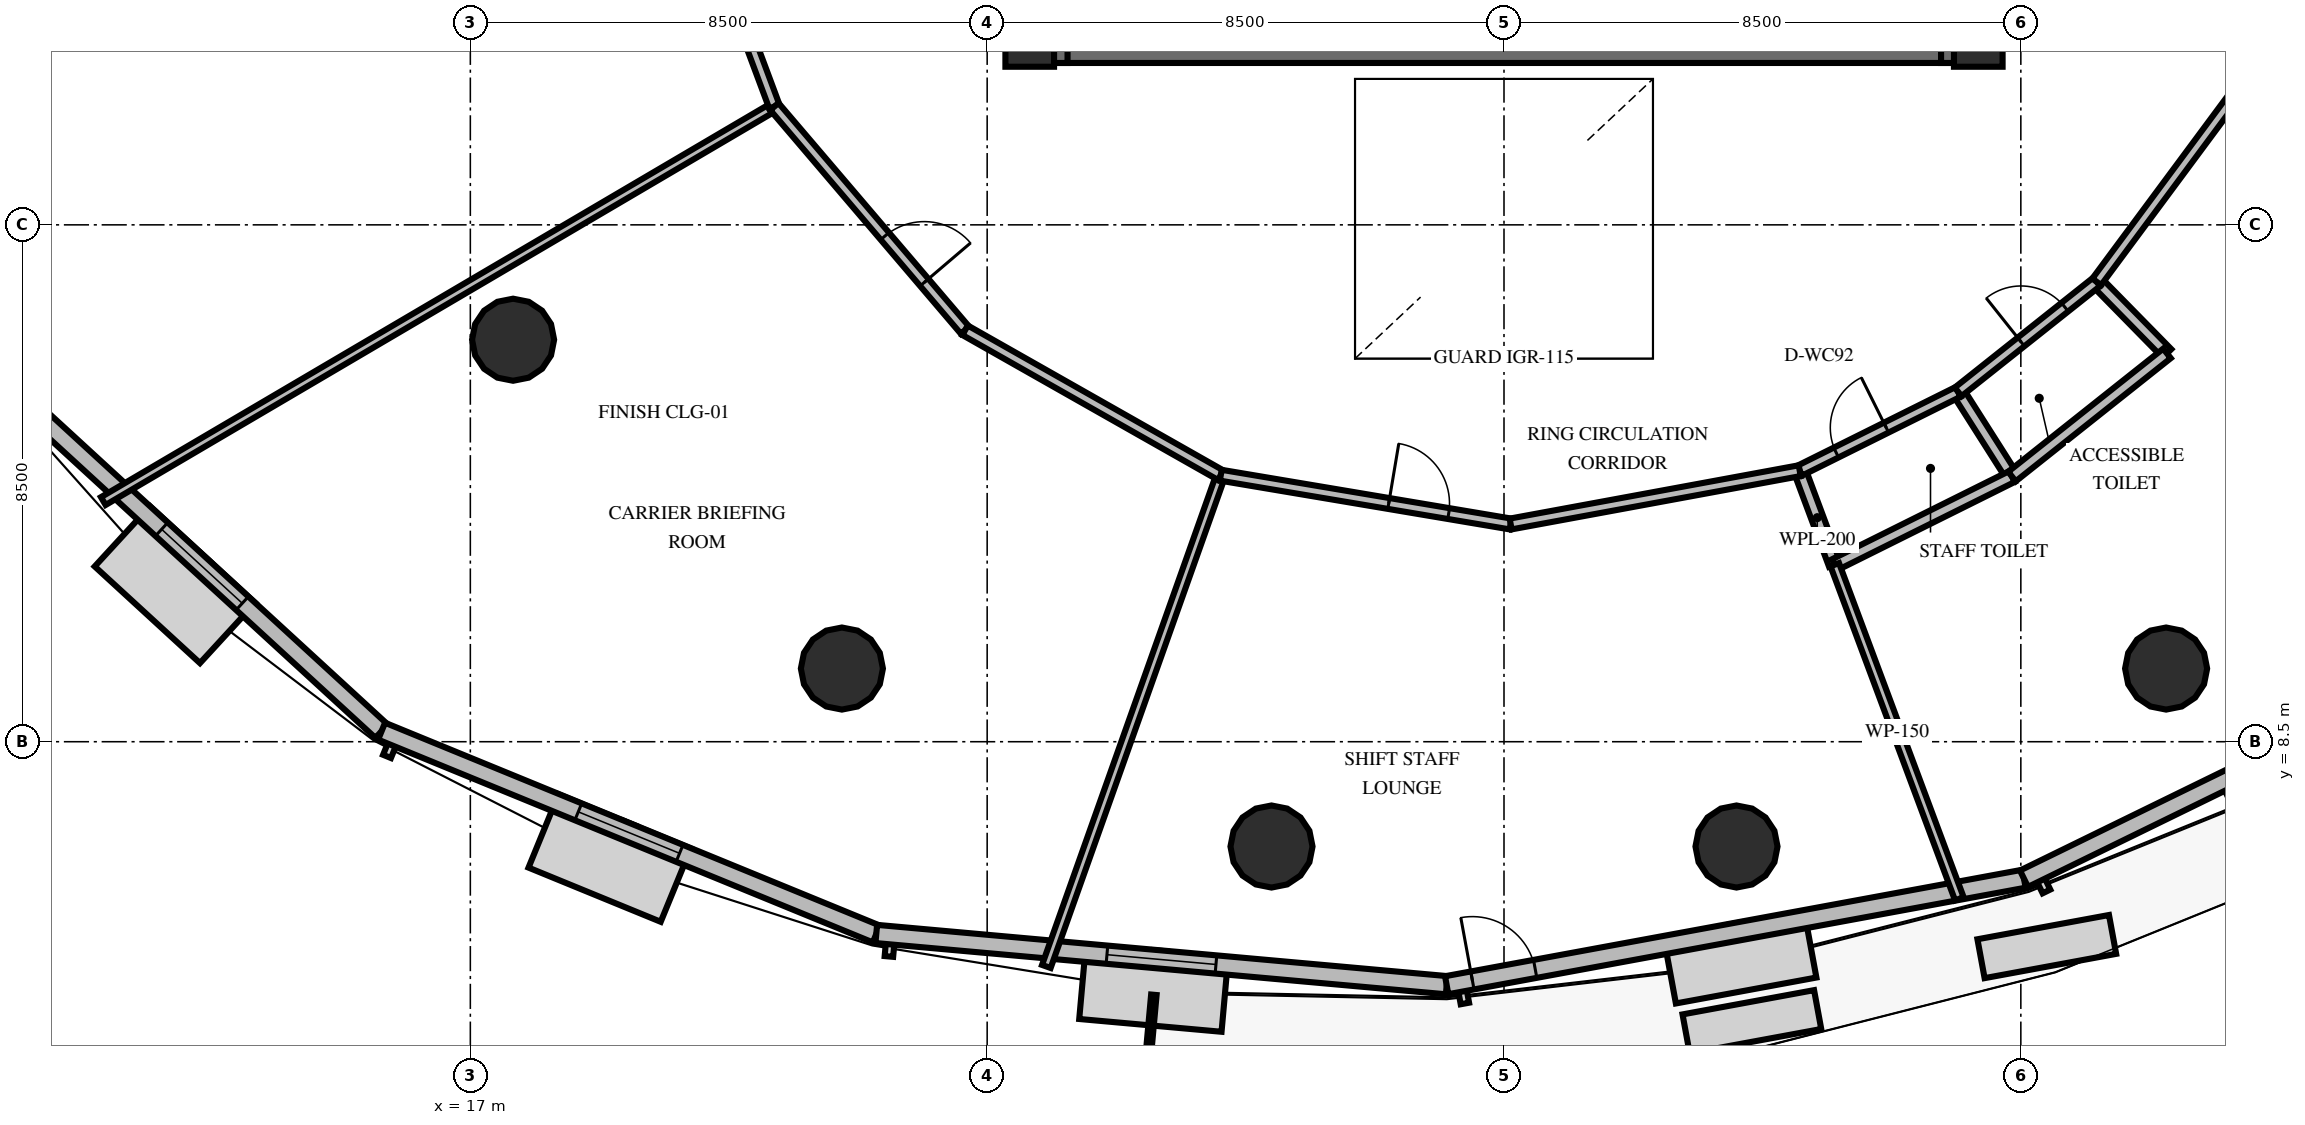
"""IFC4 building model, lengths in metres.
Left out: names, types, materials, properties, quantities, classifications, styles, units other than length and angle.
Written with IfcOpenShell. Run it as: python <this file> out.ifc"""

import sys

from ifc_helpers import new_model, si_unit, direction, frame, frame_2d, origin, origin_2d, place, context, subcontext, project, spatial, rectangle, circle, extrude, element, fill, save


model = new_model("IFC4")
c1 = context("Model", 3, precision=1e-05, world=origin(), true_north=direction((0.0, 1.0)))
c2 = subcontext(c1, "Body", "Model", "MODEL_VIEW")
j1 = project(units=[si_unit("LENGTHUNIT", "METRE"), si_unit("PLANEANGLEUNIT", "RADIAN")], contexts=[c1])
p1 = place(None, origin())
s1 = spatial("IfcSite", under=j1, at=p1, CompositionType="ELEMENT")
p2 = place(p1, origin())
s2 = spatial("IfcBuilding", under=s1, at=p2, CompositionType="ELEMENT")
p3 = place(p2, frame((0.0, 0.0, 76.2)))
s3 = spatial("IfcBuildingStorey", under=s2, at=p3, CompositionType="ELEMENT", Elevation=76.2)
p4 = place(p3, frame((25.922, 20.112, 0.0), z_axis=(0.0, 0.0, 1.0), x_axis=(1.0, 0.0, 0.0)))
e1 = element("IfcWall", 1, at=p4, inside=s3, PredefinedType="SHEAR", context=c2, shape_type="SweptSolid", body=[
    extrude(rectangle(XDim=16.166, YDim=0.9, at=frame_2d((8.083, 0.0))), origin(), (0.0, 0.0, 1.0), 4.2),
])
for number, where, z_axis, x_axis in (
    (2, (26.372, 19.662, 0.0), (0.0, 0.0, 1.0), (0.0, 1.0, 0.0)),
    (3, (41.638, 19.662, 0.0), (0.0, 0.0, 1.0), (0.0, 1.0, 0.0)),
):
    element("IfcWall", number, at=place(p3, frame(where, z_axis=z_axis, x_axis=x_axis)), inside=s3, PredefinedType="SHEAR", context=c2, shape_type="SweptSolid", body=[
        extrude(rectangle(XDim=10.876, YDim=0.9, at=frame_2d((5.438, 0.0))), origin(), (0.0, 0.0, 1.0), 4.2),
    ])
for number, where, z_axis, x_axis in (
    (4, (26.2, 20.0, 0.0), (0.0, 0.0, 1.0), (1.0, 0.0, 0.0)),
    (5, (41.8, 20.0, 0.0), (0.0, 0.0, 1.0), (1.0, 0.0, 0.0)),
):
    element("IfcColumn", number, at=place(p3, frame(where, z_axis=z_axis, x_axis=x_axis)), inside=s3, PredefinedType="PILASTER", context=c2, shape_type="SweptSolid", body=[
        extrude(rectangle(XDim=0.8, YDim=0.8, at=origin_2d()), origin(), (0.0, 0.0, 1.0), 4.2),
    ])
for number, where, z_axis, x_axis in (
    (6, (17.703, 15.111, 0.0), (0.0, 0.0, 1.0), (1.0, 0.0, 0.0)),
    (7, (23.111, 9.703, 0.0), (0.0, 0.0, 1.0), (1.0, 0.0, 0.0)),
    (8, (30.176, 6.777, 0.0), (0.0, 0.0, 1.0), (1.0, 0.0, 0.0)),
    (9, (37.824, 6.777, 0.0), (0.0, 0.0, 1.0), (1.0, 0.0, 0.0)),
    (10, (44.889, 9.703, 0.0), (0.0, 0.0, 1.0), (1.0, 0.0, 0.0)),
):
    element("IfcColumn", number, at=place(p3, frame(where, z_axis=z_axis, x_axis=x_axis)), inside=s3, PredefinedType="COLUMN", context=c2, shape_type="SweptSolid", body=[
        extrude(circle(Radius=0.675, at=origin_2d()), origin(), (0.0, 0.0, 1.0), 4.2),
    ])
p5 = place(p3, frame((9.631, 14.098, 0.0), z_axis=(0.0, 0.0, 1.0), x_axis=(0.736682732999, -0.676238531068, 0.0)))
e11 = element("IfcWall", 11, at=p5, inside=s3, PredefinedType="SOLIDWALL", context=c2, shape_type="SweptSolid", body=[
    extrude(rectangle(XDim=8.022, YDim=0.3, at=frame_2d((4.011, 0.0))), origin(), (0.0, 0.0, 1.0), 3.0),
])
p6 = place(p5, frame((3.111, 0.0, 0.8)))
e12 = element("IfcOpeningElement", 12, at=p6, cuts=e11, PredefinedType="OPENING", context=c2, shape_type="SweptSolid", body=[
    extrude(rectangle(XDim=1.8, YDim=1.95, at=frame_2d((0.9, 0.975))), frame((0.0, 0.16, 0.0), z_axis=(0.0, -1.0, 0.0), x_axis=(1.0, 0.0, 0.0)), (0.0, 0.0, 1.0), 0.32),
])
p7 = place(p3, frame((15.541, 8.673, 0.0), z_axis=(0.0, 0.0, 1.0), x_axis=(0.925289325161, -0.379262000131, 0.0)))
e13 = element("IfcWall", 13, at=p7, inside=s3, PredefinedType="SOLIDWALL", context=c2, shape_type="SweptSolid", body=[
    extrude(rectangle(XDim=8.793, YDim=0.3, at=frame_2d((4.396, 0.0))), origin(), (0.0, 0.0, 1.0), 3.0),
])
p8 = place(p7, frame((3.496, 0.0, 0.8)))
e14 = element("IfcOpeningElement", 14, at=p8, cuts=e13, PredefinedType="OPENING", context=c2, shape_type="SweptSolid", body=[
    extrude(rectangle(XDim=1.8, YDim=1.95, at=frame_2d((0.9, 0.975))), frame((0.0, 0.16, 0.0), z_axis=(0.0, -1.0, 0.0), x_axis=(1.0, 0.0, 0.0)), (0.0, 0.0, 1.0), 0.32),
])
p9 = place(p3, frame((23.676, 5.338, 0.0), z_axis=(0.0, 0.0, 1.0), x_axis=(0.995991198561, -0.089451285003, 0.0)))
e15 = element("IfcWall", 15, at=p9, inside=s3, PredefinedType="SOLIDWALL", context=c2, shape_type="SweptSolid", body=[
    extrude(rectangle(XDim=9.419, YDim=0.3, at=frame_2d((4.709, 0.0))), origin(), (0.0, 0.0, 1.0), 3.0),
])
p10 = place(p9, frame((3.809, 0.0, 0.8)))
e16 = element("IfcOpeningElement", 16, at=p10, cuts=e15, PredefinedType="OPENING", context=c2, shape_type="SweptSolid", body=[
    extrude(rectangle(XDim=1.8, YDim=1.95, at=frame_2d((0.9, 0.975))), frame((0.0, 0.16, 0.0), z_axis=(0.0, -1.0, 0.0), x_axis=(1.0, 0.0, 0.0)), (0.0, 0.0, 1.0), 0.32),
])
p11 = place(p3, frame((33.057, 4.496, 0.0), z_axis=(0.0, 0.0, 1.0), x_axis=(0.983412379237, 0.18138382608, 0.0)))
e17 = element("IfcWall", 17, at=p11, inside=s3, PredefinedType="SOLIDWALL", context=c2, shape_type="SweptSolid", body=[
    extrude(rectangle(XDim=9.655, YDim=0.3, at=frame_2d((4.827, 0.0))), origin(), (0.0, 0.0, 1.0), 3.0),
])
p12 = place(p11, frame((0.43, 0.0, 0.0)))
e18 = element("IfcOpeningElement", 18, at=p12, cuts=e17, PredefinedType="OPENING", context=c2, shape_type="SweptSolid", body=[
    extrude(rectangle(XDim=1.05, YDim=2.15, at=frame_2d((0.525, 1.075))), frame((0.0, 0.16, 0.0), z_axis=(0.0, -1.0, 0.0), x_axis=(1.0, 0.0, 0.0)), (0.0, 0.0, 1.0), 0.32),
])
p13 = place(p3, frame((42.552, 6.247, 0.0), z_axis=(0.0, 0.0, 1.0), x_axis=(0.898541129578, 0.438889323699, 0.0)))
e19 = element("IfcWall", 19, at=p13, inside=s3, PredefinedType="SOLIDWALL", context=c2, shape_type="SweptSolid", body=[
    extrude(rectangle(XDim=9.419, YDim=0.3, at=frame_2d((4.709, 0.0))), origin(), (0.0, 0.0, 1.0), 3.0),
])
p14 = place(p13, frame((3.809, 0.0, 0.8)))
e20 = element("IfcOpeningElement", 20, at=p14, cuts=e19, PredefinedType="OPENING", context=c2, shape_type="SweptSolid", body=[
    extrude(rectangle(XDim=1.8, YDim=1.95, at=frame_2d((0.9, 0.975))), frame((0.0, 0.16, 0.0), z_axis=(0.0, -1.0, 0.0), x_axis=(1.0, 0.0, 0.0)), (0.0, 0.0, 1.0), 0.32),
])
for number, where, z_axis, x_axis in (
    (21, (38.864, 12.957, 0.0), (0.0, 0.0, 1.0), (0.349, -0.937, 0.0)),
    (22, (41.469, 14.253, 0.0), (0.0, 0.0, 1.0), (0.537, -0.844, 0.0)),
):
    element("IfcWall", number, at=place(p3, frame(where, z_axis=z_axis, x_axis=x_axis)), inside=s3, PredefinedType="PLUMBINGWALL", context=c2, shape_type="SweptSolid", body=[
        extrude(rectangle(XDim=1.65, YDim=0.2, at=frame_2d((0.825, 0.0))), origin(), (0.0, 0.0, 1.0), 3.0),
    ])
p15 = place(p3, frame((39.44, 11.411, 0.0), z_axis=(0.0, 0.0, 1.0), x_axis=(0.895340385459, 0.445382525664, 0.0)))
e23 = element("IfcWall", 23, at=p15, inside=s3, PredefinedType="PLUMBINGWALL", context=c2, shape_type="SweptSolid", body=[
    extrude(rectangle(XDim=3.255, YDim=0.2, at=frame_2d((1.627, 0.0))), origin(), (0.0, 0.0, 1.0), 3.0),
])
p16 = place(p3, frame((38.864, 12.957, 0.0), z_axis=(0.0, 0.0, 1.0), x_axis=(0.895331425302, 0.445400537568, 0.0)))
e24 = element("IfcWall", 24, at=p16, inside=s3, PredefinedType="PARTITIONING", context=c2, shape_type="SweptSolid", body=[
    extrude(rectangle(XDim=2.91, YDim=0.18, at=frame_2d((1.455, 0.0))), origin(), (0.0, 0.0, 1.0), 3.0),
])
p17 = place(p16, frame((0.669, 0.0, 0.0)))
e25 = element("IfcOpeningElement", 25, at=p17, cuts=e24, PredefinedType="OPENING", context=c2, shape_type="SweptSolid", body=[
    extrude(rectangle(XDim=0.92, YDim=2.1, at=frame_2d((0.46, 1.05))), frame((0.0, 0.1, 0.0), z_axis=(0.0, -1.0, 0.0), x_axis=(1.0, 0.0, 0.0)), (0.0, 0.0, 1.0), 0.2),
])
p18 = place(p3, frame((43.748, 16.063, 0.0), z_axis=(0.0, 0.0, 1.0), x_axis=(0.700342092657, -0.713807364246, 0.0)))
e26 = element("IfcWall", 26, at=p18, inside=s3, PredefinedType="PLUMBINGWALL", context=c2, shape_type="SweptSolid", body=[
    extrude(rectangle(XDim=1.65, YDim=0.2, at=frame_2d((0.825, 0.0))), origin(), (0.0, 0.0, 1.0), 3.0),
])
p19 = place(p3, frame((42.354, 12.861, 0.0), z_axis=(0.0, 0.0, 1.0), x_axis=(0.78315381666, 0.621828030447, 0.0)))
e27 = element("IfcWall", 27, at=p19, inside=s3, PredefinedType="PLUMBINGWALL", context=c2, shape_type="SweptSolid", body=[
    extrude(rectangle(XDim=3.255, YDim=0.2, at=frame_2d((1.627, 0.0))), origin(), (0.0, 0.0, 1.0), 3.0),
])
p20 = place(p3, frame((41.469, 14.253, 0.0), z_axis=(0.0, 0.0, 1.0), x_axis=(0.783155307365, 0.621826152993, 0.0)))
e28 = element("IfcWall", 28, at=p20, inside=s3, PredefinedType="PARTITIONING", context=c2, shape_type="SweptSolid", body=[
    extrude(rectangle(XDim=2.91, YDim=0.18, at=frame_2d((1.455, 0.0))), origin(), (0.0, 0.0, 1.0), 3.0),
])
p21 = place(p20, frame((1.321, 0.0, 0.0)))
e29 = element("IfcOpeningElement", 29, at=p21, cuts=e28, PredefinedType="OPENING", context=c2, shape_type="SweptSolid", body=[
    extrude(rectangle(XDim=0.92, YDim=2.1, at=frame_2d((0.46, 1.05))), frame((0.0, 0.1, 0.0), z_axis=(0.0, -1.0, 0.0), x_axis=(1.0, 0.0, 0.0)), (0.0, 0.0, 1.0), 0.2),
])
p22 = place(p3, frame((39.44, 11.411, 0.0), z_axis=(0.0, 0.0, 1.0), x_axis=(0.349393600654, -0.936976046557, 0.0)))
e30 = element("IfcWall", 30, at=p22, inside=s3, PredefinedType="PARTITIONING", context=c2, shape_type="SweptSolid", body=[
    extrude(rectangle(XDim=5.864, YDim=0.15, at=frame_2d((2.932, 0.0))), origin(), (0.0, 0.0, 1.0), 3.0),
])
p23 = place(p3, frame((43.748, 16.063, 0.0), z_axis=(0.0, 0.0, 1.0), x_axis=(0.595496979613, 0.803357546346, 0.0)))
e31 = element("IfcWall", 31, at=p23, inside=s3, PredefinedType="PARTITIONING", context=c2, shape_type="SweptSolid", body=[
    extrude(rectangle(XDim=4.355, YDim=0.18, at=frame_2d((2.178, 0.0))), origin(), (0.0, 0.0, 1.0), 3.0),
])
p24 = place(p3, frame((22.0, 18.946, 0.0), z_axis=(0.0, 0.0, 1.0), x_axis=(-0.862073897638, -0.506782591464, 0.0)))
e32 = element("IfcWall", 32, at=p24, inside=s3, PredefinedType="PARTITIONING", context=c2, shape_type="SweptSolid", body=[
    extrude(rectangle(XDim=12.802, YDim=0.15, at=frame_2d((6.401, 0.0))), origin(), (0.0, 0.0, 1.0), 3.0),
])
p25 = place(p3, frame((20.311, 23.475, 0.0), z_axis=(0.0, 0.0, 1.0), x_axis=(0.349423780352, -0.936964792148, 0.0)))
e33 = element("IfcWall", 33, at=p25, inside=s3, PredefinedType="PARTITIONING", context=c2, shape_type="SweptSolid", body=[
    extrude(rectangle(XDim=4.834, YDim=0.18, at=frame_2d((2.417, 0.0))), origin(), (0.0, 0.0, 1.0), 3.0),
])
p26 = place(p3, frame((29.342, 12.883, 0.0), z_axis=(0.0, 0.0, 1.0), x_axis=(-0.334621977583, -0.942352445807, 0.0)))
e34 = element("IfcWall", 34, at=p26, inside=s3, PredefinedType="PARTITIONING", context=c2, shape_type="SweptSolid", body=[
    extrude(rectangle(XDim=8.573, YDim=0.15, at=frame_2d((4.286, 0.0))), origin(), (0.0, 0.0, 1.0), 3.0),
])
p27 = place(p3, frame((22.0, 18.946, 0.0), z_axis=(0.0, 0.0, 1.0), x_axis=(0.648772052091, -0.760982801662, 0.0)))
e35 = element("IfcWall", 35, at=p27, inside=s3, PredefinedType="PARTITIONING", context=c2, shape_type="SweptSolid", body=[
    extrude(rectangle(XDim=4.834, YDim=0.18, at=frame_2d((2.417, 0.0))), origin(), (0.0, 0.0, 1.0), 3.0),
])
p28 = place(p27, frame((2.801, 0.0, 0.0)))
e36 = element("IfcOpeningElement", 36, at=p28, cuts=e35, PredefinedType="OPENING", context=c2, shape_type="SweptSolid", body=[
    extrude(rectangle(XDim=1.0, YDim=2.15, at=frame_2d((0.5, 1.075))), frame((0.0, 0.1, 0.0), z_axis=(0.0, -1.0, 0.0), x_axis=(1.0, 0.0, 0.0)), (0.0, 0.0, 1.0), 0.2),
])
p29 = place(p3, frame((25.136, 15.267, 0.0), z_axis=(0.0, 0.0, 1.0), x_axis=(0.869944192354, -0.493150182186, 0.0)))
e37 = element("IfcWall", 37, at=p29, inside=s3, PredefinedType="PARTITIONING", context=c2, shape_type="SweptSolid", body=[
    extrude(rectangle(XDim=4.834, YDim=0.18, at=frame_2d((2.417, 0.0))), origin(), (0.0, 0.0, 1.0), 3.0),
])
p30 = place(p3, frame((29.342, 12.883, 0.0), z_axis=(0.0, 0.0, 1.0), x_axis=(0.986134744465, -0.165946575015, 0.0)))
e38 = element("IfcWall", 38, at=p30, inside=s3, PredefinedType="PARTITIONING", context=c2, shape_type="SweptSolid", body=[
    extrude(rectangle(XDim=4.834, YDim=0.18, at=frame_2d((2.417, 0.0))), origin(), (0.0, 0.0, 1.0), 3.0),
])
p31 = place(p30, frame((2.801, 0.0, 0.0)))
e39 = element("IfcOpeningElement", 39, at=p31, cuts=e38, PredefinedType="OPENING", context=c2, shape_type="SweptSolid", body=[
    extrude(rectangle(XDim=1.0, YDim=2.15, at=frame_2d((0.5, 1.075))), frame((0.0, 0.1, 0.0), z_axis=(0.0, -1.0, 0.0), x_axis=(1.0, 0.0, 0.0)), (0.0, 0.0, 1.0), 0.2),
])
p32 = place(p3, frame((34.109, 12.08, 0.0), z_axis=(0.0, 0.0, 1.0), x_axis=(0.983409356077, 0.181400216044, 0.0)))
e40 = element("IfcWall", 40, at=p32, inside=s3, PredefinedType="PARTITIONING", context=c2, shape_type="SweptSolid", body=[
    extrude(rectangle(XDim=4.834, YDim=0.18, at=frame_2d((2.417, 0.0))), origin(), (0.0, 0.0, 1.0), 3.0),
])
p33 = place(p6, origin())
e41 = element("IfcWindow", 41, at=p33, inside=s3, PartitioningType="SINGLE_PANEL", PredefinedType="WINDOW", context=c2, shape_type="SweptSolid", body=[
    extrude(rectangle(XDim=1.8, YDim=1.95, at=frame_2d((0.9, 0.975))), frame((0.0, 0.03, 0.0), z_axis=(0.0, -1.0, 0.0), x_axis=(1.0, 0.0, 0.0)), (0.0, 0.0, 1.0), 0.06),
])
fill(e12, e41)
p34 = place(p8, origin())
e42 = element("IfcWindow", 42, at=p34, inside=s3, PartitioningType="SINGLE_PANEL", PredefinedType="WINDOW", context=c2, shape_type="SweptSolid", body=[
    extrude(rectangle(XDim=1.8, YDim=1.95, at=frame_2d((0.9, 0.975))), frame((0.0, 0.03, 0.0), z_axis=(0.0, -1.0, 0.0), x_axis=(1.0, 0.0, 0.0)), (0.0, 0.0, 1.0), 0.06),
])
fill(e14, e42)
p35 = place(p10, origin())
e43 = element("IfcWindow", 43, at=p35, inside=s3, PartitioningType="SINGLE_PANEL", PredefinedType="WINDOW", context=c2, shape_type="SweptSolid", body=[
    extrude(rectangle(XDim=1.8, YDim=1.95, at=frame_2d((0.9, 0.975))), frame((0.0, 0.03, 0.0), z_axis=(0.0, -1.0, 0.0), x_axis=(1.0, 0.0, 0.0)), (0.0, 0.0, 1.0), 0.06),
])
fill(e16, e43)
p36 = place(p12, origin())
e44 = element("IfcDoor", 44, at=p36, inside=s3, OperationType="SINGLE_SWING_LEFT", PredefinedType="DOOR", context=c2, shape_type="SweptSolid", body=[
    extrude(rectangle(XDim=1.05, YDim=2.15, at=frame_2d((0.525, 1.075))), frame((0.0, 0.025, 0.0), z_axis=(0.0, -1.0, 0.0), x_axis=(1.0, 0.0, 0.0)), (0.0, 0.0, 1.0), 0.05),
])
fill(e18, e44)
p37 = place(p17, origin())
e45 = element("IfcDoor", 45, at=p37, inside=s3, OperationType="SINGLE_SWING_RIGHT", PredefinedType="DOOR", context=c2, shape_type="SweptSolid", body=[
    extrude(rectangle(XDim=0.92, YDim=2.1, at=frame_2d((0.46, 1.05))), frame((0.0, 0.025, 0.0), z_axis=(0.0, -1.0, 0.0), x_axis=(1.0, 0.0, 0.0)), (0.0, 0.0, 1.0), 0.05),
])
fill(e25, e45)
p38 = place(p21, origin())
e46 = element("IfcDoor", 46, at=p38, inside=s3, OperationType="SINGLE_SWING_LEFT", PredefinedType="DOOR", context=c2, shape_type="SweptSolid", body=[
    extrude(rectangle(XDim=0.92, YDim=2.1, at=frame_2d((0.46, 1.05))), frame((0.0, 0.025, 0.0), z_axis=(0.0, -1.0, 0.0), x_axis=(1.0, 0.0, 0.0)), (0.0, 0.0, 1.0), 0.05),
])
fill(e29, e46)
p39 = place(p28, origin())
e47 = element("IfcDoor", 47, at=p39, inside=s3, OperationType="SINGLE_SWING_RIGHT", PredefinedType="DOOR", context=c2, shape_type="SweptSolid", body=[
    extrude(rectangle(XDim=1.0, YDim=2.15, at=frame_2d((0.5, 1.075))), frame((0.0, 0.025, 0.0), z_axis=(0.0, -1.0, 0.0), x_axis=(1.0, 0.0, 0.0)), (0.0, 0.0, 1.0), 0.05),
])
fill(e36, e47)
p40 = place(p31, origin())
e48 = element("IfcDoor", 48, at=p40, inside=s3, OperationType="SINGLE_SWING_LEFT", PredefinedType="DOOR", context=c2, shape_type="SweptSolid", body=[
    extrude(rectangle(XDim=1.0, YDim=2.15, at=frame_2d((0.5, 1.075))), frame((0.0, 0.025, 0.0), z_axis=(0.0, -1.0, 0.0), x_axis=(1.0, 0.0, 0.0)), (0.0, 0.0, 1.0), 0.05),
])
fill(e39, e48)
save(model, sys.argv[1])
